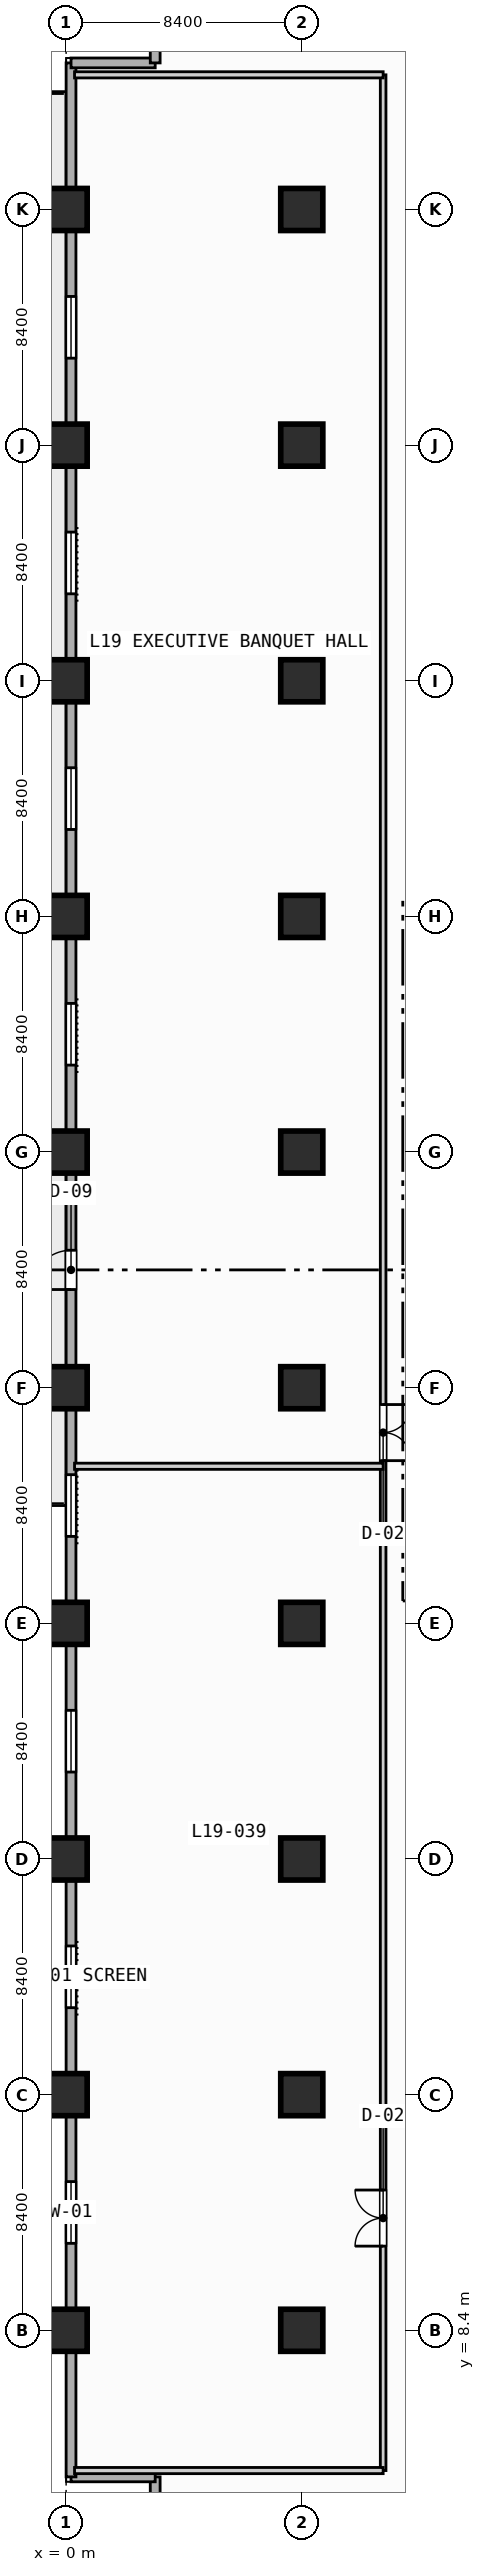
"""IFC4 building model, lengths in metres.
Left out: names, types, materials, properties, quantities, classifications, styles, units other than length and angle.
Written with IfcOpenShell. Run it as: python <this file> out.ifc"""

import sys

from ifc_helpers import new_model, si_unit, direction, frame, frame_2d, origin, origin_2d, place, context, subcontext, project, spatial, rectangle, extrude, element, fill, save


model = new_model("IFC4")
c1 = context("Model", 3, precision=1e-05, world=origin(), true_north=direction((0.0, 1.0)))
c2 = subcontext(c1, "Body", "Model", "MODEL_VIEW")
j1 = project(units=[si_unit("LENGTHUNIT", "METRE"), si_unit("PLANEANGLEUNIT", "RADIAN")], contexts=[c1])
p1 = place(None, origin())
s1 = spatial("IfcSite", under=j1, at=p1, CompositionType="ELEMENT")
p2 = place(p1, origin())
s2 = spatial("IfcBuilding", under=s1, at=p2, CompositionType="ELEMENT")
p3 = place(p2, frame((0.0, 0.0, 81.4)))
s3 = spatial("IfcBuildingStorey", under=s2, at=p3, CompositionType="ELEMENT", Elevation=81.4)
for number, where, z_axis, x_axis in (
    (1, (0.0, 8.4, 0.0), (0.0, 0.0, 1.0), (1.0, 0.0, 0.0)),
    (2, (0.0, 16.8, 0.0), (0.0, 0.0, 1.0), (1.0, 0.0, 0.0)),
    (3, (0.0, 25.2, 0.0), (0.0, 0.0, 1.0), (1.0, 0.0, 0.0)),
    (4, (0.0, 33.6, 0.0), (0.0, 0.0, 1.0), (1.0, 0.0, 0.0)),
    (5, (0.0, 42.0, 0.0), (0.0, 0.0, 1.0), (1.0, 0.0, 0.0)),
    (6, (0.0, 50.4, 0.0), (0.0, 0.0, 1.0), (1.0, 0.0, 0.0)),
    (7, (0.0, 58.8, 0.0), (0.0, 0.0, 1.0), (1.0, 0.0, 0.0)),
    (8, (0.0, 67.2, 0.0), (0.0, 0.0, 1.0), (1.0, 0.0, 0.0)),
    (9, (0.0, 75.6, 0.0), (0.0, 0.0, 1.0), (1.0, 0.0, 0.0)),
    (10, (0.0, 84.0, 0.0), (0.0, 0.0, 1.0), (1.0, 0.0, 0.0)),
    (11, (8.4, 8.4, 0.0), (0.0, 0.0, 1.0), (1.0, 0.0, 0.0)),
    (12, (8.4, 16.8, 0.0), (0.0, 0.0, 1.0), (1.0, 0.0, 0.0)),
    (13, (8.4, 25.2, 0.0), (0.0, 0.0, 1.0), (1.0, 0.0, 0.0)),
    (14, (8.4, 33.6, 0.0), (0.0, 0.0, 1.0), (1.0, 0.0, 0.0)),
    (15, (8.4, 42.0, 0.0), (0.0, 0.0, 1.0), (1.0, 0.0, 0.0)),
    (16, (8.4, 50.4, 0.0), (0.0, 0.0, 1.0), (1.0, 0.0, 0.0)),
    (17, (8.4, 58.8, 0.0), (0.0, 0.0, 1.0), (1.0, 0.0, 0.0)),
    (18, (8.4, 67.2, 0.0), (0.0, 0.0, 1.0), (1.0, 0.0, 0.0)),
    (19, (8.4, 75.6, 0.0), (0.0, 0.0, 1.0), (1.0, 0.0, 0.0)),
    (20, (8.4, 84.0, 0.0), (0.0, 0.0, 1.0), (1.0, 0.0, 0.0)),
):
    element("IfcColumn", number, at=place(p3, frame(where, z_axis=z_axis, x_axis=x_axis)), inside=s3, PredefinedType="COLUMN", context=c2, shape_type="SweptSolid", body=[
        extrude(rectangle(XDim=1.5, YDim=1.5, at=origin_2d()), origin(), (0.0, 0.0, 1.0), 3.8),
    ])
for number, where, z_axis, x_axis in (
    (21, (3.175, 0.175, 0.0), (0.0, 0.0, 1.0), (0.0, 1.0, 0.0)),
    (22, (3.175, 3.175, 0.0), (0.0, 0.0, 1.0), (-1.0, 0.0, 0.0)),
):
    element("IfcWall", number, at=place(p3, frame(where, z_axis=z_axis, x_axis=x_axis)), inside=s3, PredefinedType="STANDARD", context=c2, shape_type="SweptSolid", body=[
        extrude(rectangle(XDim=3.0, YDim=0.35, at=frame_2d((1.5, 0.0))), origin(), (0.0, 0.0, 1.0), 3.55),
    ])
p4 = place(p3, frame((0.175, 3.175, 0.0), z_axis=(0.0, 0.0, 1.0), x_axis=(0.0, 1.0, 0.0)))
e23 = element("IfcWall", 23, at=p4, inside=s3, PredefinedType="STANDARD", context=c2, shape_type="SweptSolid", body=[
    extrude(rectangle(XDim=86.05, YDim=0.35, at=frame_2d((43.025, 0.0))), origin(), (0.0, 0.0, 1.0), 3.55),
])
p5 = place(p4, frame((42.325, 0.0, 0.0)))
e24 = element("IfcOpeningElement", 24, at=p5, cuts=e23, PredefinedType="OPENING", context=c2, shape_type="SweptSolid", body=[
    extrude(rectangle(XDim=1.4, YDim=2.2, at=frame_2d((0.7, 1.1))), frame((0.0, 0.185, 0.0), z_axis=(0.0, -1.0, 0.0), x_axis=(1.0, 0.0, 0.0)), (0.0, 0.0, 1.0), 0.37),
])
p6 = place(p4, frame((8.325, 0.0, 0.85)))
e25 = element("IfcOpeningElement", 25, at=p6, cuts=e23, PredefinedType="OPENING", context=c2, shape_type="SweptSolid", body=[
    extrude(rectangle(XDim=2.2, YDim=1.8, at=frame_2d((1.1, 0.9))), frame((0.0, 0.185, 0.0), z_axis=(0.0, -1.0, 0.0), x_axis=(1.0, 0.0, 0.0)), (0.0, 0.0, 1.0), 0.37),
])
p7 = place(p4, frame((16.725, 0.0, 0.85)))
e26 = element("IfcOpeningElement", 26, at=p7, cuts=e23, PredefinedType="OPENING", context=c2, shape_type="SweptSolid", body=[
    extrude(rectangle(XDim=2.2, YDim=1.8, at=frame_2d((1.1, 0.9))), frame((0.0, 0.185, 0.0), z_axis=(0.0, -1.0, 0.0), x_axis=(1.0, 0.0, 0.0)), (0.0, 0.0, 1.0), 0.37),
])
p8 = place(p4, frame((25.125, 0.0, 0.85)))
e27 = element("IfcOpeningElement", 27, at=p8, cuts=e23, PredefinedType="OPENING", context=c2, shape_type="SweptSolid", body=[
    extrude(rectangle(XDim=2.2, YDim=1.8, at=frame_2d((1.1, 0.9))), frame((0.0, 0.185, 0.0), z_axis=(0.0, -1.0, 0.0), x_axis=(1.0, 0.0, 0.0)), (0.0, 0.0, 1.0), 0.37),
])
p9 = place(p4, frame((33.525, 0.0, 0.85)))
e28 = element("IfcOpeningElement", 28, at=p9, cuts=e23, PredefinedType="OPENING", context=c2, shape_type="SweptSolid", body=[
    extrude(rectangle(XDim=2.2, YDim=1.8, at=frame_2d((1.1, 0.9))), frame((0.0, 0.185, 0.0), z_axis=(0.0, -1.0, 0.0), x_axis=(1.0, 0.0, 0.0)), (0.0, 0.0, 1.0), 0.37),
])
p10 = place(p4, frame((50.325, 0.0, 0.85)))
e29 = element("IfcOpeningElement", 29, at=p10, cuts=e23, PredefinedType="OPENING", context=c2, shape_type="SweptSolid", body=[
    extrude(rectangle(XDim=2.2, YDim=1.8, at=frame_2d((1.1, 0.9))), frame((0.0, 0.185, 0.0), z_axis=(0.0, -1.0, 0.0), x_axis=(1.0, 0.0, 0.0)), (0.0, 0.0, 1.0), 0.37),
])
p11 = place(p4, frame((58.725, 0.0, 0.85)))
e30 = element("IfcOpeningElement", 30, at=p11, cuts=e23, PredefinedType="OPENING", context=c2, shape_type="SweptSolid", body=[
    extrude(rectangle(XDim=2.2, YDim=1.8, at=frame_2d((1.1, 0.9))), frame((0.0, 0.185, 0.0), z_axis=(0.0, -1.0, 0.0), x_axis=(1.0, 0.0, 0.0)), (0.0, 0.0, 1.0), 0.37),
])
p12 = place(p4, frame((67.125, 0.0, 0.85)))
e31 = element("IfcOpeningElement", 31, at=p12, cuts=e23, PredefinedType="OPENING", context=c2, shape_type="SweptSolid", body=[
    extrude(rectangle(XDim=2.2, YDim=1.8, at=frame_2d((1.1, 0.9))), frame((0.0, 0.185, 0.0), z_axis=(0.0, -1.0, 0.0), x_axis=(1.0, 0.0, 0.0)), (0.0, 0.0, 1.0), 0.37),
])
p13 = place(p4, frame((75.525, 0.0, 0.85)))
e32 = element("IfcOpeningElement", 32, at=p13, cuts=e23, PredefinedType="OPENING", context=c2, shape_type="SweptSolid", body=[
    extrude(rectangle(XDim=2.2, YDim=1.8, at=frame_2d((1.1, 0.9))), frame((0.0, 0.185, 0.0), z_axis=(0.0, -1.0, 0.0), x_axis=(1.0, 0.0, 0.0)), (0.0, 0.0, 1.0), 0.37),
])
for number, where, z_axis, x_axis in (
    (33, (0.175, 89.225, 0.0), (0.0, 0.0, 1.0), (1.0, 0.0, 0.0)),
    (34, (3.175, 89.225, 0.0), (0.0, 0.0, 1.0), (0.0, 1.0, 0.0)),
):
    element("IfcWall", number, at=place(p3, frame(where, z_axis=z_axis, x_axis=x_axis)), inside=s3, PredefinedType="STANDARD", context=c2, shape_type="SweptSolid", body=[
        extrude(rectangle(XDim=3.0, YDim=0.35, at=frame_2d((1.5, 0.0))), origin(), (0.0, 0.0, 1.0), 3.55),
    ])
p14 = place(p3, frame((11.3, 3.4, 0.0), z_axis=(0.0, 0.0, 1.0), x_axis=(0.0, 1.0, 0.0)))
e35 = element("IfcWall", 35, at=p14, inside=s3, PredefinedType="PARTITIONING", context=c2, shape_type="SweptSolid", body=[
    extrude(rectangle(XDim=85.4, YDim=0.2, at=frame_2d((42.7, 0.0))), origin(), (0.0, 0.0, 1.0), 3.55),
])
p15 = place(p14, frame((8.0, 0.0, 0.0)))
e36 = element("IfcOpeningElement", 36, at=p15, cuts=e35, PredefinedType="OPENING", context=c2, shape_type="SweptSolid", body=[
    extrude(rectangle(XDim=2.0, YDim=2.15, at=frame_2d((1.0, 1.075))), frame((0.0, 0.11, 0.0), z_axis=(0.0, -1.0, 0.0), x_axis=(1.0, 0.0, 0.0)), (0.0, 0.0, 1.0), 0.22),
])
p16 = place(p14, frame((36.0, 0.0, 0.0)))
e37 = element("IfcOpeningElement", 37, at=p16, cuts=e35, PredefinedType="OPENING", context=c2, shape_type="SweptSolid", body=[
    extrude(rectangle(XDim=2.0, YDim=2.15, at=frame_2d((1.0, 1.075))), frame((0.0, 0.11, 0.0), z_axis=(0.0, -1.0, 0.0), x_axis=(1.0, 0.0, 0.0)), (0.0, 0.0, 1.0), 0.22),
])
for number, where, z_axis, x_axis in (
    (38, (0.3, 3.4, 0.0), (0.0, 0.0, 1.0), (1.0, 0.0, 0.0)),
    (39, (0.3, 39.2, 0.0), (0.0, 0.0, 1.0), (1.0, 0.0, 0.0)),
    (40, (0.3, 88.8, 0.0), (0.0, 0.0, 1.0), (1.0, 0.0, 0.0)),
):
    element("IfcWall", number, at=place(p3, frame(where, z_axis=z_axis, x_axis=x_axis)), inside=s3, PredefinedType="PARTITIONING", context=c2, shape_type="SweptSolid", body=[
        extrude(rectangle(XDim=11.0, YDim=0.22, at=frame_2d((5.5, 0.0))), origin(), (0.0, 0.0, 1.0), 3.55),
    ])
p17 = place(p5, origin())
e41 = element("IfcDoor", 41, at=p17, inside=s3, OperationType="SINGLE_SWING_LEFT", PredefinedType="DOOR", context=c2, shape_type="SweptSolid", body=[
    extrude(rectangle(XDim=1.4, YDim=2.2, at=frame_2d((0.7, 1.1))), frame((0.0, 0.025, 0.0), z_axis=(0.0, -1.0, 0.0), x_axis=(1.0, 0.0, 0.0)), (0.0, 0.0, 1.0), 0.05),
])
fill(e24, e41)
p18 = place(p6, origin())
e42 = element("IfcWindow", 42, at=p18, inside=s3, PartitioningType="SINGLE_PANEL", PredefinedType="WINDOW", context=c2, shape_type="SweptSolid", body=[
    extrude(rectangle(XDim=2.2, YDim=1.8, at=frame_2d((1.1, 0.9))), frame((0.0, 0.03, 0.0), z_axis=(0.0, -1.0, 0.0), x_axis=(1.0, 0.0, 0.0)), (0.0, 0.0, 1.0), 0.06),
])
fill(e25, e42)
p19 = place(p7, origin())
e43 = element("IfcWindow", 43, at=p19, inside=s3, PartitioningType="SINGLE_PANEL", PredefinedType="WINDOW", context=c2, shape_type="SweptSolid", body=[
    extrude(rectangle(XDim=2.2, YDim=1.8, at=frame_2d((1.1, 0.9))), frame((0.0, 0.03, 0.0), z_axis=(0.0, -1.0, 0.0), x_axis=(1.0, 0.0, 0.0)), (0.0, 0.0, 1.0), 0.06),
])
fill(e26, e43)
p20 = place(p8, origin())
e44 = element("IfcWindow", 44, at=p20, inside=s3, PartitioningType="SINGLE_PANEL", PredefinedType="WINDOW", context=c2, shape_type="SweptSolid", body=[
    extrude(rectangle(XDim=2.2, YDim=1.8, at=frame_2d((1.1, 0.9))), frame((0.0, 0.03, 0.0), z_axis=(0.0, -1.0, 0.0), x_axis=(1.0, 0.0, 0.0)), (0.0, 0.0, 1.0), 0.06),
])
fill(e27, e44)
p21 = place(p9, origin())
e45 = element("IfcWindow", 45, at=p21, inside=s3, PartitioningType="SINGLE_PANEL", PredefinedType="WINDOW", context=c2, shape_type="SweptSolid", body=[
    extrude(rectangle(XDim=2.2, YDim=1.8, at=frame_2d((1.1, 0.9))), frame((0.0, 0.03, 0.0), z_axis=(0.0, -1.0, 0.0), x_axis=(1.0, 0.0, 0.0)), (0.0, 0.0, 1.0), 0.06),
])
fill(e28, e45)
p22 = place(p10, origin())
e46 = element("IfcWindow", 46, at=p22, inside=s3, PartitioningType="SINGLE_PANEL", PredefinedType="WINDOW", context=c2, shape_type="SweptSolid", body=[
    extrude(rectangle(XDim=2.2, YDim=1.8, at=frame_2d((1.1, 0.9))), frame((0.0, 0.03, 0.0), z_axis=(0.0, -1.0, 0.0), x_axis=(1.0, 0.0, 0.0)), (0.0, 0.0, 1.0), 0.06),
])
fill(e29, e46)
p23 = place(p11, origin())
e47 = element("IfcWindow", 47, at=p23, inside=s3, PartitioningType="SINGLE_PANEL", PredefinedType="WINDOW", context=c2, shape_type="SweptSolid", body=[
    extrude(rectangle(XDim=2.2, YDim=1.8, at=frame_2d((1.1, 0.9))), frame((0.0, 0.03, 0.0), z_axis=(0.0, -1.0, 0.0), x_axis=(1.0, 0.0, 0.0)), (0.0, 0.0, 1.0), 0.06),
])
fill(e30, e47)
p24 = place(p12, origin())
e48 = element("IfcWindow", 48, at=p24, inside=s3, PartitioningType="SINGLE_PANEL", PredefinedType="WINDOW", context=c2, shape_type="SweptSolid", body=[
    extrude(rectangle(XDim=2.2, YDim=1.8, at=frame_2d((1.1, 0.9))), frame((0.0, 0.03, 0.0), z_axis=(0.0, -1.0, 0.0), x_axis=(1.0, 0.0, 0.0)), (0.0, 0.0, 1.0), 0.06),
])
fill(e31, e48)
p25 = place(p13, origin())
e49 = element("IfcWindow", 49, at=p25, inside=s3, PartitioningType="SINGLE_PANEL", PredefinedType="WINDOW", context=c2, shape_type="SweptSolid", body=[
    extrude(rectangle(XDim=2.2, YDim=1.8, at=frame_2d((1.1, 0.9))), frame((0.0, 0.03, 0.0), z_axis=(0.0, -1.0, 0.0), x_axis=(1.0, 0.0, 0.0)), (0.0, 0.0, 1.0), 0.06),
])
fill(e32, e49)
p26 = place(p15, origin())
e50 = element("IfcDoor", 50, at=p26, inside=s3, OperationType="SINGLE_SWING_LEFT", PredefinedType="DOOR", context=c2, shape_type="SweptSolid", body=[
    extrude(rectangle(XDim=2.0, YDim=2.15, at=frame_2d((1.0, 1.075))), frame((0.0, 0.025, 0.0), z_axis=(0.0, -1.0, 0.0), x_axis=(1.0, 0.0, 0.0)), (0.0, 0.0, 1.0), 0.05),
])
fill(e36, e50)
p27 = place(p16, origin())
e51 = element("IfcDoor", 51, at=p27, inside=s3, OperationType="SINGLE_SWING_RIGHT", PredefinedType="DOOR", context=c2, shape_type="SweptSolid", body=[
    extrude(rectangle(XDim=2.0, YDim=2.15, at=frame_2d((1.0, 1.075))), frame((0.0, 0.025, 0.0), z_axis=(0.0, -1.0, 0.0), x_axis=(1.0, 0.0, 0.0)), (0.0, 0.0, 1.0), 0.05),
])
fill(e37, e51)
save(model, sys.argv[1])
